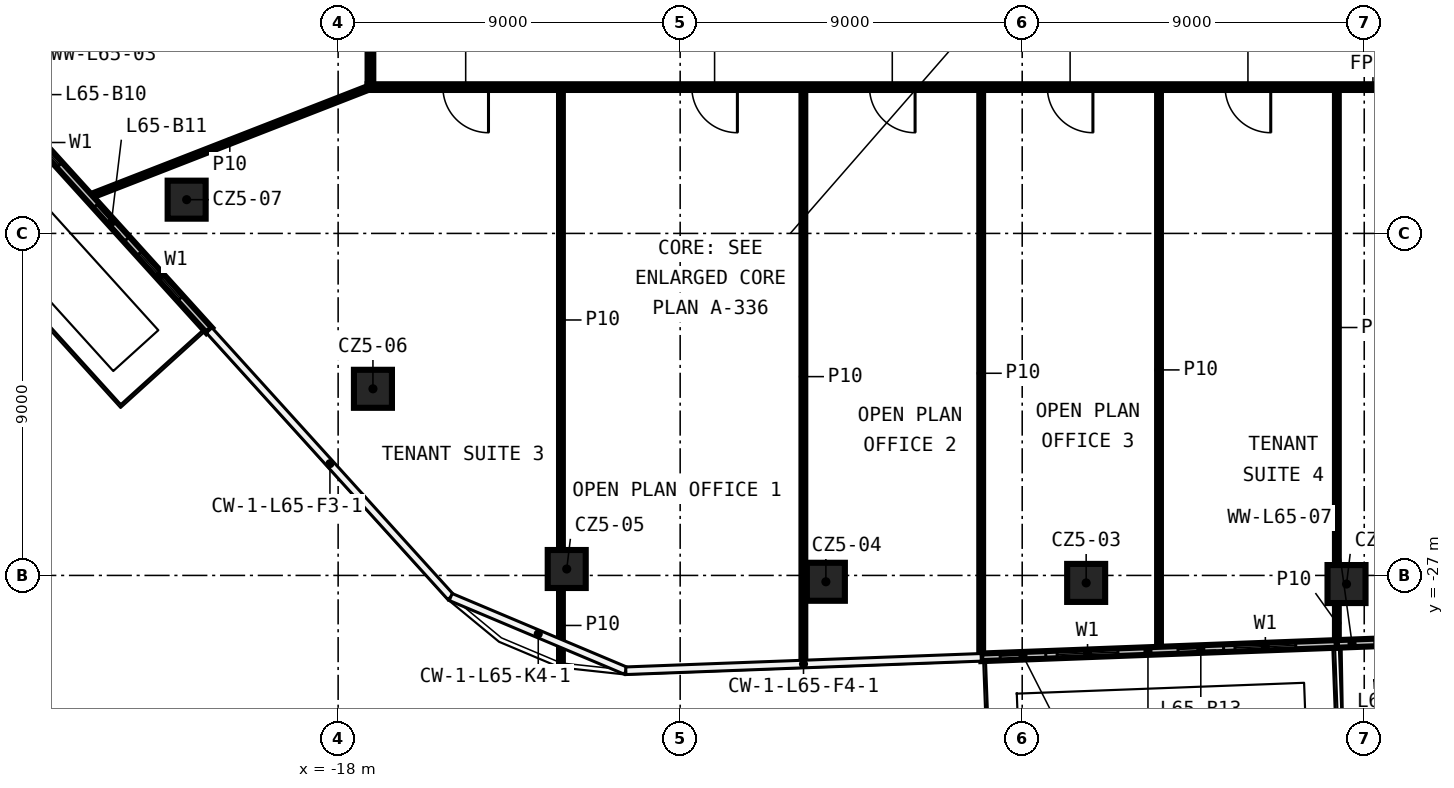
"""IFC4 building model, lengths in metres.
Left out: names, types, materials, properties, quantities, classifications, styles, units other than length and angle.
Written with IfcOpenShell. Run it as: python <this file> out.ifc"""

import sys

from ifc_helpers import new_model, si_unit, direction, frame, frame_2d, origin, origin_2d, place, context, subcontext, project, spatial, rectangle, extrude, element, fill, save


model = new_model("IFC4")
c1 = context("Model", 3, precision=1e-05, world=origin(), true_north=direction((0.0, 1.0)))
c2 = subcontext(c1, "Body", "Model", "MODEL_VIEW")
j1 = project(units=[si_unit("LENGTHUNIT", "METRE"), si_unit("PLANEANGLEUNIT", "RADIAN")], contexts=[c1])
p1 = place(None, origin())
s1 = spatial("IfcSite", under=j1, at=p1, CompositionType="ELEMENT")
p2 = place(p1, origin())
s2 = spatial("IfcBuilding", under=s1, at=p2, CompositionType="ELEMENT")
p3 = place(p2, frame((0.0, 0.0, 306.8)))
s3 = spatial("IfcBuildingStorey", under=s2, at=p3, CompositionType="ELEMENT", Elevation=306.8)
for number, where, z_axis, x_axis in (
    (1, (8.534, -27.227, 0.0), (0.0, 0.0, 1.0), (1.0, 0.0, 0.0)),
    (2, (1.683, -27.197, 0.0), (0.0, 0.0, 1.0), (1.0, 0.0, 0.0)),
    (3, (-5.166, -27.167, 0.0), (0.0, 0.0, 1.0), (1.0, 0.0, 0.0)),
    (4, (-11.985, -26.831, 0.0), (0.0, 0.0, 1.0), (1.0, 0.0, 0.0)),
    (5, (-17.084, -22.089, 0.0), (0.0, 0.0, 1.0), (1.0, 0.0, 0.0)),
    (6, (-21.986, -17.112, 0.0), (0.0, 0.0, 1.0), (1.0, 0.0, 0.0)),
):
    element("IfcColumn", number, at=place(p3, frame(where, z_axis=z_axis, x_axis=x_axis)), inside=s3, PredefinedType="COLUMN", context=c2, shape_type="SweptSolid", body=[
        extrude(rectangle(XDim=1.0, YDim=1.0, at=origin_2d()), origin(), (0.0, 0.0, 1.0), 3.82),
    ])
p4 = place(p3, frame((17.225, -14.15, 0.0), z_axis=(0.0, 0.0, 1.0), x_axis=(-1.0, 0.0, 0.0)))
e7 = element("IfcWall", 7, at=p4, inside=s3, PredefinedType="PARTITIONING", context=c2, shape_type="SweptSolid", body=[
    extrude(rectangle(XDim=34.45, YDim=0.15, at=frame_2d((17.225, 0.0))), origin(), (0.0, 0.0, 1.0), 3.82),
])
p5 = place(p4, frame((31.269, 0.0, 0.0)))
e8 = element("IfcOpeningElement", 8, at=p5, cuts=e7, PredefinedType="OPENING", context=c2, shape_type="SweptSolid", body=[
    extrude(rectangle(XDim=1.2, YDim=2.1, at=frame_2d((0.6, 1.05))), frame((0.0, 0.085, 0.0), z_axis=(0.0, -1.0, 0.0), x_axis=(1.0, 0.0, 0.0)), (0.0, 0.0, 1.0), 0.17),
])
p6 = place(p4, frame((24.719, 0.0, 0.0)))
e9 = element("IfcOpeningElement", 9, at=p6, cuts=e7, PredefinedType="OPENING", context=c2, shape_type="SweptSolid", body=[
    extrude(rectangle(XDim=1.2, YDim=2.1, at=frame_2d((0.6, 1.05))), frame((0.0, 0.085, 0.0), z_axis=(0.0, -1.0, 0.0), x_axis=(1.0, 0.0, 0.0)), (0.0, 0.0, 1.0), 0.17),
])
p7 = place(p4, frame((20.044, 0.0, 0.0)))
e10 = element("IfcOpeningElement", 10, at=p7, cuts=e7, PredefinedType="OPENING", context=c2, shape_type="SweptSolid", body=[
    extrude(rectangle(XDim=1.2, YDim=2.1, at=frame_2d((0.6, 1.05))), frame((0.0, 0.085, 0.0), z_axis=(0.0, -1.0, 0.0), x_axis=(1.0, 0.0, 0.0)), (0.0, 0.0, 1.0), 0.17),
])
p8 = place(p4, frame((15.364, 0.0, 0.0)))
e11 = element("IfcOpeningElement", 11, at=p8, cuts=e7, PredefinedType="OPENING", context=c2, shape_type="SweptSolid", body=[
    extrude(rectangle(XDim=1.2, YDim=2.1, at=frame_2d((0.6, 1.05))), frame((0.0, 0.085, 0.0), z_axis=(0.0, -1.0, 0.0), x_axis=(1.0, 0.0, 0.0)), (0.0, 0.0, 1.0), 0.17),
])
p9 = place(p4, frame((10.685, 0.0, 0.0)))
e12 = element("IfcOpeningElement", 12, at=p9, cuts=e7, PredefinedType="OPENING", context=c2, shape_type="SweptSolid", body=[
    extrude(rectangle(XDim=1.2, YDim=2.1, at=frame_2d((0.6, 1.05))), frame((0.0, 0.085, 0.0), z_axis=(0.0, -1.0, 0.0), x_axis=(1.0, 0.0, 0.0)), (0.0, 0.0, 1.0), 0.17),
])
p10 = place(p4, frame((4.107, 0.0, 0.0)))
e13 = element("IfcOpeningElement", 13, at=p10, cuts=e7, PredefinedType="OPENING", context=c2, shape_type="SweptSolid", body=[
    extrude(rectangle(XDim=1.2, YDim=2.1, at=frame_2d((0.6, 1.05))), frame((0.0, 0.085, 0.0), z_axis=(0.0, -1.0, 0.0), x_axis=(1.0, 0.0, 0.0)), (0.0, 0.0, 1.0), 0.17),
])
p11 = place(p3, frame((-24.55, -17.033, 0.0), z_axis=(0.0, 0.0, 1.0), x_axis=(0.931751191714, 0.363097392911, 0.0)))
e14 = element("IfcWall", 14, at=p11, inside=s3, PredefinedType="PARTITIONING", context=c2, shape_type="SweptSolid", body=[
    extrude(rectangle(XDim=7.942, YDim=0.1, at=frame_2d((3.971, 0.0))), origin(), (0.0, 0.0, 1.0), 3.82),
])
p12 = place(p3, frame((8.28, -28.782, 0.0), z_axis=(0.0, 0.0, 1.0), x_axis=(0.0, 1.0, 0.0)))
e15 = element("IfcWall", 15, at=p12, inside=s3, PredefinedType="PARTITIONING", context=c2, shape_type="SweptSolid", body=[
    extrude(rectangle(XDim=1.055, YDim=0.1, at=frame_2d((0.528, 0.0))), origin(), (0.0, 0.0, 1.0), 3.82),
])
p13 = place(p3, frame((8.28, -26.727, 0.0), z_axis=(0.0, 0.0, 1.0), x_axis=(0.0, 1.0, 0.0)))
e16 = element("IfcWall", 16, at=p13, inside=s3, PredefinedType="PARTITIONING", context=c2, shape_type="SweptSolid", body=[
    extrude(rectangle(XDim=12.502, YDim=0.1, at=frame_2d((6.251, 0.0))), origin(), (0.0, 0.0, 1.0), 3.82),
])
p14 = place(p3, frame((3.6, -28.959, 0.0), z_axis=(0.0, 0.0, 1.0), x_axis=(0.0, 1.0, 0.0)))
e17 = element("IfcWall", 17, at=p14, inside=s3, PredefinedType="PARTITIONING", context=c2, shape_type="SweptSolid", body=[
    extrude(rectangle(XDim=14.734, YDim=0.1, at=frame_2d((7.367, 0.0))), origin(), (0.0, 0.0, 1.0), 3.82),
])
p15 = place(p3, frame((-1.079, -29.135, 0.0), z_axis=(0.0, 0.0, 1.0), x_axis=(0.0, 1.0, 0.0)))
e18 = element("IfcWall", 18, at=p15, inside=s3, PredefinedType="PARTITIONING", context=c2, shape_type="SweptSolid", body=[
    extrude(rectangle(XDim=14.91, YDim=0.1, at=frame_2d((7.455, 0.0))), origin(), (0.0, 0.0, 1.0), 3.82),
])
p16 = place(p3, frame((-5.758, -29.312, 0.0), z_axis=(0.0, 0.0, 1.0), x_axis=(0.0, 1.0, 0.0)))
e19 = element("IfcWall", 19, at=p16, inside=s3, PredefinedType="PARTITIONING", context=c2, shape_type="SweptSolid", body=[
    extrude(rectangle(XDim=15.087, YDim=0.1, at=frame_2d((7.543, 0.0))), origin(), (0.0, 0.0, 1.0), 3.82),
])
p17 = place(p3, frame((-12.137, -29.302, 0.0), z_axis=(0.0, 0.0, 1.0), x_axis=(0.0, 1.0, 0.0)))
e20 = element("IfcWall", 20, at=p17, inside=s3, PredefinedType="PARTITIONING", context=c2, shape_type="SweptSolid", body=[
    extrude(rectangle(XDim=1.971, YDim=0.1, at=frame_2d((0.985, 0.0))), origin(), (0.0, 0.0, 1.0), 3.82),
])
p18 = place(p3, frame((-12.137, -26.331, 0.0), z_axis=(0.0, 0.0, 1.0), x_axis=(0.0, 1.0, 0.0)))
e21 = element("IfcWall", 21, at=p18, inside=s3, PredefinedType="PARTITIONING", context=c2, shape_type="SweptSolid", body=[
    extrude(rectangle(XDim=12.106, YDim=0.1, at=frame_2d((6.053, 0.0))), origin(), (0.0, 0.0, 1.0), 3.82),
])
p19 = place(p3, frame((-17.15, -14.075, 0.0), z_axis=(0.0, 0.0, 1.0), x_axis=(0.0, 1.0, 0.0)))
e22 = element("IfcWall", 22, at=p19, inside=s3, PredefinedType="PARTITIONING", context=c2, shape_type="SweptSolid", body=[
    extrude(rectangle(XDim=28.15, YDim=0.15, at=frame_2d((14.075, 0.0))), origin(), (0.0, 0.0, 1.0), 3.82),
])
p20 = place(p19, frame((10.867, 0.0, 0.0)))
e23 = element("IfcOpeningElement", 23, at=p20, cuts=e22, PredefinedType="OPENING", context=c2, shape_type="SweptSolid", body=[
    extrude(rectangle(XDim=1.2, YDim=2.1, at=frame_2d((0.6, 1.05))), frame((0.0, 0.085, 0.0), z_axis=(0.0, -1.0, 0.0), x_axis=(1.0, 0.0, 0.0)), (0.0, 0.0, 1.0), 0.17),
])
p21 = place(p19, frame((3.801, 0.0, 0.0)))
e24 = element("IfcOpeningElement", 24, at=p21, cuts=e22, PredefinedType="OPENING", context=c2, shape_type="SweptSolid", body=[
    extrude(rectangle(XDim=1.2, YDim=2.1, at=frame_2d((0.6, 1.05))), frame((0.0, 0.085, 0.0), z_axis=(0.0, -1.0, 0.0), x_axis=(1.0, 0.0, 0.0)), (0.0, 0.0, 1.0), 0.17),
])
p22 = place(p19, frame((18.279, 0.0, 0.0)))
e25 = element("IfcOpeningElement", 25, at=p22, cuts=e22, PredefinedType="OPENING", context=c2, shape_type="SweptSolid", body=[
    extrude(rectangle(XDim=1.2, YDim=2.1, at=frame_2d((0.6, 1.05))), frame((0.0, 0.085, 0.0), z_axis=(0.0, -1.0, 0.0), x_axis=(1.0, 0.0, 0.0)), (0.0, 0.0, 1.0), 0.17),
])
p23 = place(p3, frame((-30.926, -10.023, 0.0), z_axis=(0.0, 0.0, 1.0), x_axis=(0.671222052588, -0.74125633631, 0.0)))
e26 = element("IfcWall", 26, at=p23, inside=s3, PredefinedType="SOLIDWALL", context=c2, shape_type="SweptSolid", body=[
    extrude(rectangle(XDim=14.202, YDim=0.2, at=frame_2d((7.101, 0.0))), origin(), (0.0, 0.0, 1.0), 3.82),
])
p24 = place(p23, frame((2.0, 0.0, 0.6)))
e27 = element("IfcOpeningElement", 27, at=p24, cuts=e26, PredefinedType="OPENING", context=c2, shape_type="SweptSolid", body=[
    extrude(rectangle(XDim=1.6, YDim=2.4, at=frame_2d((0.8, 1.2))), frame((0.0, 0.11, 0.0), z_axis=(0.0, -1.0, 0.0), x_axis=(1.0, 0.0, 0.0)), (0.0, 0.0, 1.0), 0.22),
])
p25 = place(p23, frame((0.5, 0.0, 0.0)))
e28 = element("IfcOpeningElement", 28, at=p25, cuts=e26, PredefinedType="OPENING", context=c2, shape_type="SweptSolid", body=[
    extrude(rectangle(XDim=1.2, YDim=2.4, at=frame_2d((0.6, 1.2))), frame((0.0, 0.11, 0.0), z_axis=(0.0, -1.0, 0.0), x_axis=(1.0, 0.0, 0.0)), (0.0, 0.0, 1.0), 0.22),
])
p26 = place(p23, frame((6.734, 0.0, 0.6)))
e29 = element("IfcOpeningElement", 29, at=p26, cuts=e26, PredefinedType="OPENING", context=c2, shape_type="SweptSolid", body=[
    extrude(rectangle(XDim=1.6, YDim=2.4, at=frame_2d((0.8, 1.2))), frame((0.0, 0.11, 0.0), z_axis=(0.0, -1.0, 0.0), x_axis=(1.0, 0.0, 0.0)), (0.0, 0.0, 1.0), 0.22),
])
p27 = place(p23, frame((5.234, 0.0, 0.0)))
e30 = element("IfcOpeningElement", 30, at=p27, cuts=e26, PredefinedType="OPENING", context=c2, shape_type="SweptSolid", body=[
    extrude(rectangle(XDim=1.2, YDim=2.4, at=frame_2d((0.6, 1.2))), frame((0.0, 0.11, 0.0), z_axis=(0.0, -1.0, 0.0), x_axis=(1.0, 0.0, 0.0)), (0.0, 0.0, 1.0), 0.22),
])
p28 = place(p23, frame((11.468, 0.0, 0.6)))
e31 = element("IfcOpeningElement", 31, at=p28, cuts=e26, PredefinedType="OPENING", context=c2, shape_type="SweptSolid", body=[
    extrude(rectangle(XDim=1.6, YDim=2.4, at=frame_2d((0.8, 1.2))), frame((0.0, 0.11, 0.0), z_axis=(0.0, -1.0, 0.0), x_axis=(1.0, 0.0, 0.0)), (0.0, 0.0, 1.0), 0.22),
])
p29 = place(p23, frame((9.768, 0.0, 0.0)))
e32 = element("IfcOpeningElement", 32, at=p29, cuts=e26, PredefinedType="OPENING", context=c2, shape_type="SweptSolid", body=[
    extrude(rectangle(XDim=1.2, YDim=2.4, at=frame_2d((0.6, 1.2))), frame((0.0, 0.11, 0.0), z_axis=(0.0, -1.0, 0.0), x_axis=(1.0, 0.0, 0.0)), (0.0, 0.0, 1.0), 0.22),
])
p30 = place(p3, frame((-1.079, -29.156, 0.0), z_axis=(0.0, 0.0, 1.0), x_axis=(0.999288261827, 0.037722271597, 0.0)))
e33 = element("IfcWall", 33, at=p30, inside=s3, PredefinedType="SOLIDWALL", context=c2, shape_type="SweptSolid", body=[
    extrude(rectangle(XDim=9.365, YDim=0.2, at=frame_2d((4.683, 0.0))), origin(), (0.0, 0.0, 1.0), 3.82),
])
p31 = place(p30, frame((2.0, 0.0, 0.6)))
e34 = element("IfcOpeningElement", 34, at=p31, cuts=e33, PredefinedType="OPENING", context=c2, shape_type="SweptSolid", body=[
    extrude(rectangle(XDim=1.6, YDim=2.4, at=frame_2d((0.8, 1.2))), frame((0.0, 0.11, 0.0), z_axis=(0.0, -1.0, 0.0), x_axis=(1.0, 0.0, 0.0)), (0.0, 0.0, 1.0), 0.22),
])
p32 = place(p30, frame((0.5, 0.0, 0.0)))
e35 = element("IfcOpeningElement", 35, at=p32, cuts=e33, PredefinedType="OPENING", context=c2, shape_type="SweptSolid", body=[
    extrude(rectangle(XDim=1.2, YDim=2.4, at=frame_2d((0.6, 1.2))), frame((0.0, 0.11, 0.0), z_axis=(0.0, -1.0, 0.0), x_axis=(1.0, 0.0, 0.0)), (0.0, 0.0, 1.0), 0.22),
])
p33 = place(p30, frame((6.683, 0.0, 0.6)))
e36 = element("IfcOpeningElement", 36, at=p33, cuts=e33, PredefinedType="OPENING", context=c2, shape_type="SweptSolid", body=[
    extrude(rectangle(XDim=1.6, YDim=2.4, at=frame_2d((0.8, 1.2))), frame((0.0, 0.11, 0.0), z_axis=(0.0, -1.0, 0.0), x_axis=(1.0, 0.0, 0.0)), (0.0, 0.0, 1.0), 0.22),
])
p34 = place(p30, frame((5.183, 0.0, 0.0)))
e37 = element("IfcOpeningElement", 37, at=p34, cuts=e33, PredefinedType="OPENING", context=c2, shape_type="SweptSolid", body=[
    extrude(rectangle(XDim=1.2, YDim=2.4, at=frame_2d((0.6, 1.2))), frame((0.0, 0.11, 0.0), z_axis=(0.0, -1.0, 0.0), x_axis=(1.0, 0.0, 0.0)), (0.0, 0.0, 1.0), 0.22),
])
p35 = place(p3, frame((8.28, -28.802, 0.0), z_axis=(0.0, 0.0, 1.0), x_axis=(0.999288539502, 0.037714915082, 0.0)))
e38 = element("IfcWall", 38, at=p35, inside=s3, PredefinedType="SOLIDWALL", context=c2, shape_type="SweptSolid", body=[
    extrude(rectangle(XDim=4.674, YDim=0.2, at=frame_2d((2.337, 0.0))), origin(), (0.0, 0.0, 1.0), 3.82),
])
p36 = place(p35, frame((2.5, 0.0, 0.6)))
e39 = element("IfcOpeningElement", 39, at=p36, cuts=e38, PredefinedType="OPENING", context=c2, shape_type="SweptSolid", body=[
    extrude(rectangle(XDim=1.6, YDim=2.4, at=frame_2d((0.8, 1.2))), frame((0.0, 0.11, 0.0), z_axis=(0.0, -1.0, 0.0), x_axis=(1.0, 0.0, 0.0)), (0.0, 0.0, 1.0), 0.22),
])
p37 = place(p35, frame((1.0, 0.0, 0.0)))
e40 = element("IfcOpeningElement", 40, at=p37, cuts=e38, PredefinedType="OPENING", context=c2, shape_type="SweptSolid", body=[
    extrude(rectangle(XDim=1.2, YDim=2.4, at=frame_2d((0.6, 1.2))), frame((0.0, 0.11, 0.0), z_axis=(0.0, -1.0, 0.0), x_axis=(1.0, 0.0, 0.0)), (0.0, 0.0, 1.0), 0.22),
])
p38 = place(p5, origin())
e41 = element("IfcDoor", 41, at=p38, inside=s3, OperationType="SINGLE_SWING_RIGHT", PredefinedType="DOOR", context=c2, shape_type="SweptSolid", body=[
    extrude(rectangle(XDim=1.2, YDim=2.1, at=frame_2d((0.6, 1.05))), frame((0.0, 0.025, 0.0), z_axis=(0.0, -1.0, 0.0), x_axis=(1.0, 0.0, 0.0)), (0.0, 0.0, 1.0), 0.05),
])
fill(e8, e41)
p39 = place(p6, origin())
e42 = element("IfcDoor", 42, at=p39, inside=s3, OperationType="SINGLE_SWING_LEFT", PredefinedType="DOOR", context=c2, shape_type="SweptSolid", body=[
    extrude(rectangle(XDim=1.2, YDim=2.1, at=frame_2d((0.6, 1.05))), frame((0.0, 0.025, 0.0), z_axis=(0.0, -1.0, 0.0), x_axis=(1.0, 0.0, 0.0)), (0.0, 0.0, 1.0), 0.05),
])
fill(e9, e42)
p40 = place(p7, origin())
e43 = element("IfcDoor", 43, at=p40, inside=s3, OperationType="SINGLE_SWING_RIGHT", PredefinedType="DOOR", context=c2, shape_type="SweptSolid", body=[
    extrude(rectangle(XDim=1.2, YDim=2.1, at=frame_2d((0.6, 1.05))), frame((0.0, 0.025, 0.0), z_axis=(0.0, -1.0, 0.0), x_axis=(1.0, 0.0, 0.0)), (0.0, 0.0, 1.0), 0.05),
])
fill(e10, e43)
p41 = place(p8, origin())
e44 = element("IfcDoor", 44, at=p41, inside=s3, OperationType="SINGLE_SWING_LEFT", PredefinedType="DOOR", context=c2, shape_type="SweptSolid", body=[
    extrude(rectangle(XDim=1.2, YDim=2.1, at=frame_2d((0.6, 1.05))), frame((0.0, 0.025, 0.0), z_axis=(0.0, -1.0, 0.0), x_axis=(1.0, 0.0, 0.0)), (0.0, 0.0, 1.0), 0.05),
])
fill(e11, e44)
p42 = place(p9, origin())
e45 = element("IfcDoor", 45, at=p42, inside=s3, OperationType="SINGLE_SWING_RIGHT", PredefinedType="DOOR", context=c2, shape_type="SweptSolid", body=[
    extrude(rectangle(XDim=1.2, YDim=2.1, at=frame_2d((0.6, 1.05))), frame((0.0, 0.025, 0.0), z_axis=(0.0, -1.0, 0.0), x_axis=(1.0, 0.0, 0.0)), (0.0, 0.0, 1.0), 0.05),
])
fill(e12, e45)
p43 = place(p26, origin())
e46 = element("IfcWindow", 46, at=p43, inside=s3, PartitioningType="SINGLE_PANEL", PredefinedType="WINDOW", context=c2, shape_type="SweptSolid", body=[
    extrude(rectangle(XDim=1.6, YDim=2.4, at=frame_2d((0.8, 1.2))), frame((0.0, 0.03, 0.0), z_axis=(0.0, -1.0, 0.0), x_axis=(1.0, 0.0, 0.0)), (0.0, 0.0, 1.0), 0.06),
])
fill(e29, e46)
p44 = place(p28, origin())
e47 = element("IfcWindow", 47, at=p44, inside=s3, PartitioningType="SINGLE_PANEL", PredefinedType="WINDOW", context=c2, shape_type="SweptSolid", body=[
    extrude(rectangle(XDim=1.6, YDim=2.4, at=frame_2d((0.8, 1.2))), frame((0.0, 0.03, 0.0), z_axis=(0.0, -1.0, 0.0), x_axis=(1.0, 0.0, 0.0)), (0.0, 0.0, 1.0), 0.06),
])
fill(e31, e47)
p45 = place(p29, origin())
e48 = element("IfcDoor", 48, at=p45, inside=s3, OperationType="SLIDING_TO_LEFT", PredefinedType="DOOR", context=c2, shape_type="SweptSolid", body=[
    extrude(rectangle(XDim=1.2, YDim=2.4, at=frame_2d((0.6, 1.2))), frame((0.0, 0.025, 0.0), z_axis=(0.0, -1.0, 0.0), x_axis=(1.0, 0.0, 0.0)), (0.0, 0.0, 1.0), 0.05),
])
fill(e32, e48)
p46 = place(p31, origin())
e49 = element("IfcWindow", 49, at=p46, inside=s3, PartitioningType="SINGLE_PANEL", PredefinedType="WINDOW", context=c2, shape_type="SweptSolid", body=[
    extrude(rectangle(XDim=1.6, YDim=2.4, at=frame_2d((0.8, 1.2))), frame((0.0, 0.03, 0.0), z_axis=(0.0, -1.0, 0.0), x_axis=(1.0, 0.0, 0.0)), (0.0, 0.0, 1.0), 0.06),
])
fill(e34, e49)
p47 = place(p32, origin())
e50 = element("IfcDoor", 50, at=p47, inside=s3, OperationType="SLIDING_TO_LEFT", PredefinedType="DOOR", context=c2, shape_type="SweptSolid", body=[
    extrude(rectangle(XDim=1.2, YDim=2.4, at=frame_2d((0.6, 1.2))), frame((0.0, 0.025, 0.0), z_axis=(0.0, -1.0, 0.0), x_axis=(1.0, 0.0, 0.0)), (0.0, 0.0, 1.0), 0.05),
])
fill(e35, e50)
p48 = place(p33, origin())
e51 = element("IfcWindow", 51, at=p48, inside=s3, PartitioningType="SINGLE_PANEL", PredefinedType="WINDOW", context=c2, shape_type="SweptSolid", body=[
    extrude(rectangle(XDim=1.6, YDim=2.4, at=frame_2d((0.8, 1.2))), frame((0.0, 0.03, 0.0), z_axis=(0.0, -1.0, 0.0), x_axis=(1.0, 0.0, 0.0)), (0.0, 0.0, 1.0), 0.06),
])
fill(e36, e51)
p49 = place(p34, origin())
e52 = element("IfcDoor", 52, at=p49, inside=s3, OperationType="SLIDING_TO_LEFT", PredefinedType="DOOR", context=c2, shape_type="SweptSolid", body=[
    extrude(rectangle(XDim=1.2, YDim=2.4, at=frame_2d((0.6, 1.2))), frame((0.0, 0.025, 0.0), z_axis=(0.0, -1.0, 0.0), x_axis=(1.0, 0.0, 0.0)), (0.0, 0.0, 1.0), 0.05),
])
fill(e37, e52)
p50 = place(p37, origin())
e53 = element("IfcDoor", 53, at=p50, inside=s3, OperationType="SLIDING_TO_LEFT", PredefinedType="DOOR", context=c2, shape_type="SweptSolid", body=[
    extrude(rectangle(XDim=1.2, YDim=2.4, at=frame_2d((0.6, 1.2))), frame((0.0, 0.025, 0.0), z_axis=(0.0, -1.0, 0.0), x_axis=(1.0, 0.0, 0.0)), (0.0, 0.0, 1.0), 0.05),
])
fill(e40, e53)
save(model, sys.argv[1])
